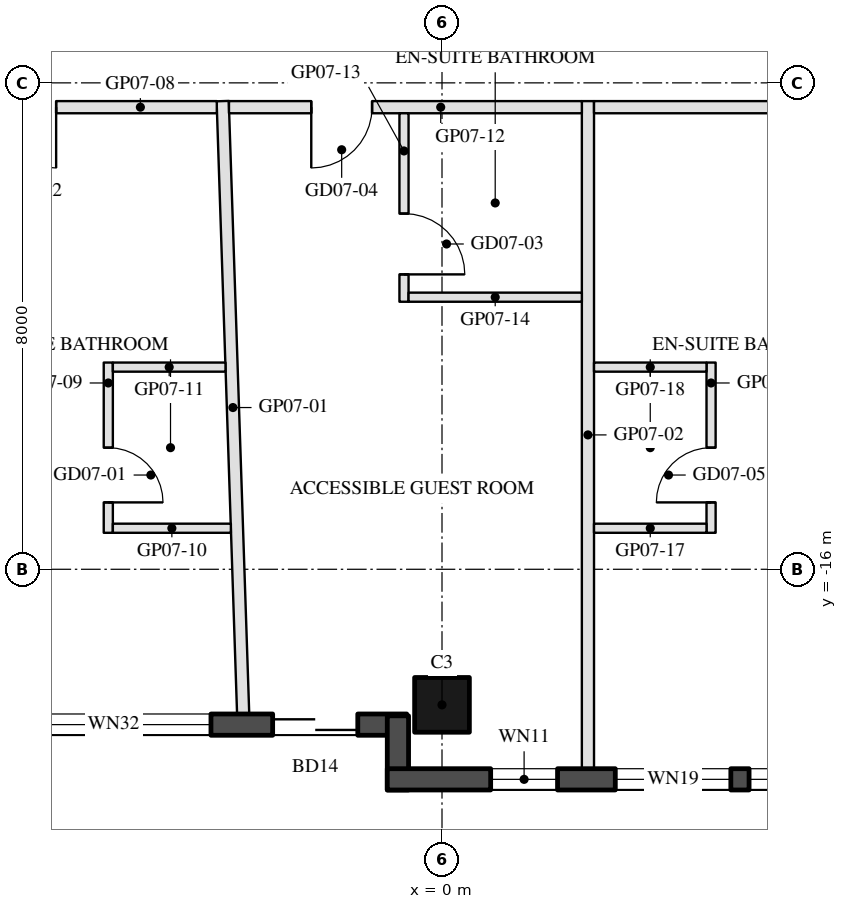
"""IFC4 building model, lengths in metres.
Left out: names, types, materials, properties, quantities, classifications, styles, units other than length and angle.
Written with IfcOpenShell. Run it as: python <this file> out.ifc"""

import sys

from ifc_helpers import new_model, si_unit, direction, frame, frame_2d, origin, origin_2d, place, context, subcontext, project, spatial, rectangle, hollow_rectangle, extrude, element, fill, save


model = new_model("IFC4")
c1 = context("Model", 3, precision=1e-05, world=origin(), true_north=direction((0.0, 1.0)))
c2 = subcontext(c1, "Body", "Model", "MODEL_VIEW")
j1 = project(units=[si_unit("LENGTHUNIT", "METRE"), si_unit("PLANEANGLEUNIT", "RADIAN")], contexts=[c1])
p1 = place(None, origin())
s1 = spatial("IfcSite", under=j1, at=p1, CompositionType="ELEMENT")
p2 = place(p1, origin())
s2 = spatial("IfcBuilding", under=s1, at=p2, CompositionType="ELEMENT")
p3 = place(p2, frame((0.0, 0.0, 94.6)))
s3 = spatial("IfcBuildingStorey", under=s2, at=p3, CompositionType="ELEMENT", Elevation=94.6)
p4 = place(p3, frame((0.0, -18.23, 0.0), z_axis=(0.0, 0.0, 1.0), x_axis=(-1.0, 0.0, 0.0)))
e1 = element("IfcColumn", 1, at=p4, inside=s3, PredefinedType="COLUMN", context=c2, shape_type="SweptSolid", body=[
    extrude(hollow_rectangle(XDim=0.9, YDim=0.9, WallThickness=0.04, at=origin_2d()), origin(), (0.0, 0.0, 1.0), 3.7),
])
p5 = place(p3, frame((-7.32, -18.555, 0.0), z_axis=(0.0, 0.0, 1.0), x_axis=(1.0, 0.0, 0.0)))
e2 = element("IfcWall", 2, at=p5, inside=s3, PredefinedType="SOLIDWALL", context=c2, shape_type="SweptSolid", body=[
    extrude(rectangle(XDim=6.74, YDim=0.35, at=frame_2d((3.37, 0.0))), origin(), (0.0, 0.0, 1.0), 3.55),
])
p6 = place(p5, frame((0.32, 0.0, 0.3)))
e3 = element("IfcOpeningElement", 3, at=p6, cuts=e2, PredefinedType="OPENING", context=c2, shape_type="SweptSolid", body=[
    extrude(rectangle(XDim=3.2, YDim=2.65, at=frame_2d((1.6, 1.325))), frame((0.0, 0.185, 0.0), z_axis=(0.0, -1.0, 0.0), x_axis=(1.0, 0.0, 0.0)), (0.0, 0.0, 1.0), 0.37),
])
p7 = place(p5, frame((4.535, 0.0, 0.0)))
e4 = element("IfcOpeningElement", 4, at=p7, cuts=e2, PredefinedType="OPENING", context=c2, shape_type="SweptSolid", body=[
    extrude(rectangle(XDim=1.4, YDim=2.4, at=frame_2d((0.7, 1.2))), frame((0.0, 0.185, 0.0), z_axis=(0.0, -1.0, 0.0), x_axis=(1.0, 0.0, 0.0)), (0.0, 0.0, 1.0), 0.37),
])
p8 = place(p3, frame((-0.725, -18.41, 0.0), z_axis=(0.0, 0.0, 1.0), x_axis=(0.0, -1.0, 0.0)))
e5 = element("IfcWall", 5, at=p8, inside=s3, PredefinedType="SOLIDWALL", context=c2, shape_type="SweptSolid", body=[
    extrude(rectangle(XDim=1.22, YDim=0.35, at=frame_2d((0.61, 0.0))), origin(), (0.0, 0.0, 1.0), 3.55),
])
p9 = place(p3, frame((-0.9, -19.455, 0.0), z_axis=(0.0, 0.0, 1.0), x_axis=(1.0, 0.0, 0.0)))
e6 = element("IfcWall", 6, at=p9, inside=s3, PredefinedType="SOLIDWALL", context=c2, shape_type="SweptSolid", body=[
    extrude(rectangle(XDim=9.7, YDim=0.35, at=frame_2d((4.85, 0.0))), origin(), (0.0, 0.0, 1.0), 3.55),
])
p10 = place(p9, frame((1.7, 0.0, 0.3)))
e7 = element("IfcOpeningElement", 7, at=p10, cuts=e6, PredefinedType="OPENING", context=c2, shape_type="SweptSolid", body=[
    extrude(rectangle(XDim=1.1, YDim=2.65, at=frame_2d((0.55, 1.325))), frame((0.0, 0.185, 0.0), z_axis=(0.0, -1.0, 0.0), x_axis=(1.0, 0.0, 0.0)), (0.0, 0.0, 1.0), 0.37),
])
p11 = place(p9, frame((3.75, 0.0, 0.3)))
e8 = element("IfcOpeningElement", 8, at=p11, cuts=e6, PredefinedType="OPENING", context=c2, shape_type="SweptSolid", body=[
    extrude(rectangle(XDim=1.9, YDim=2.65, at=frame_2d((0.95, 1.325))), frame((0.0, 0.185, 0.0), z_axis=(0.0, -1.0, 0.0), x_axis=(1.0, 0.0, 0.0)), (0.0, 0.0, 1.0), 0.37),
])
p12 = place(p9, frame((5.95, 0.0, 0.3)))
e9 = element("IfcOpeningElement", 9, at=p12, cuts=e6, PredefinedType="OPENING", context=c2, shape_type="SweptSolid", body=[
    extrude(rectangle(XDim=1.9, YDim=2.65, at=frame_2d((0.95, 1.325))), frame((0.0, 0.185, 0.0), z_axis=(0.0, -1.0, 0.0), x_axis=(1.0, 0.0, 0.0)), (0.0, 0.0, 1.0), 0.37),
])
p13 = place(p3, frame((-3.27, -18.38, 0.0), z_axis=(0.0, 0.0, 1.0), x_axis=(-0.03338172908, 0.999442674776, 0.0)))
e10 = element("IfcWall", 10, at=p13, inside=s3, PredefinedType="PARTITIONING", context=c2, shape_type="SweptSolid", body=[
    extrude(rectangle(XDim=10.085, YDim=0.2, at=frame_2d((5.043, 0.0))), origin(), (0.0, 0.0, 1.0), 2.96),
])
p14 = place(p3, frame((2.4, -19.28, 0.0), z_axis=(0.0, 0.0, 1.0), x_axis=(0.0, 1.0, 0.0)))
e11 = element("IfcWall", 11, at=p14, inside=s3, PredefinedType="PARTITIONING", context=c2, shape_type="SweptSolid", body=[
    extrude(rectangle(XDim=10.98, YDim=0.2, at=frame_2d((5.49, 0.0))), origin(), (0.0, 0.0, 1.0), 2.96),
])
p15 = place(p3, frame((-3.703, -8.4, 0.0), z_axis=(0.0, 0.0, 1.0), x_axis=(-1.0, 0.0, 0.0)))
e12 = element("IfcWall", 12, at=p15, inside=s3, PredefinedType="PARTITIONING", context=c2, shape_type="SweptSolid", body=[
    extrude(rectangle(XDim=6.285, YDim=0.2, at=frame_2d((3.143, 0.0))), origin(), (0.0, 0.0, 1.0), 2.95),
])
p16 = place(p15, frame((2.642, 0.0, 0.0)))
e13 = element("IfcOpeningElement", 13, at=p16, cuts=e12, PredefinedType="OPENING", context=c2, shape_type="SweptSolid", body=[
    extrude(rectangle(XDim=1.0, YDim=2.1, at=frame_2d((0.5, 1.05))), frame((0.0, 0.11, 0.0), z_axis=(0.0, -1.0, 0.0), x_axis=(1.0, 0.0, 0.0)), (0.0, 0.0, 1.0), 0.22),
])
p17 = place(p3, frame((-5.488, -12.6, 0.0), z_axis=(0.0, 0.0, 1.0), x_axis=(0.0, -1.0, 0.0)))
e14 = element("IfcWall", 14, at=p17, inside=s3, PredefinedType="PARTITIONING", context=c2, shape_type="SweptSolid", body=[
    extrude(rectangle(XDim=2.8, YDim=0.15, at=frame_2d((1.4, 0.0))), origin(), (0.0, 0.0, 1.0), 3.55),
])
p18 = place(p17, frame((1.4, 0.0, 0.0)))
e15 = element("IfcOpeningElement", 15, at=p18, cuts=e14, PredefinedType="OPENING", context=c2, shape_type="SweptSolid", body=[
    extrude(rectangle(XDim=0.9, YDim=2.1, at=frame_2d((0.45, 1.05))), frame((0.0, 0.085, 0.0), z_axis=(0.0, -1.0, 0.0), x_axis=(1.0, 0.0, 0.0)), (0.0, 0.0, 1.0), 0.17),
])
p19 = place(p3, frame((-5.413, -15.325, 0.0), z_axis=(0.0, 0.0, 1.0), x_axis=(1.0, 0.0, 0.0)))
e16 = element("IfcWall", 16, at=p19, inside=s3, PredefinedType="PARTITIONING", context=c2, shape_type="SweptSolid", body=[
    extrude(rectangle(XDim=1.941, YDim=0.15, at=frame_2d((0.97, 0.0))), origin(), (0.0, 0.0, 1.0), 2.95),
])
p20 = place(p3, frame((-5.413, -12.675, 0.0), z_axis=(0.0, 0.0, 1.0), x_axis=(1.0, 0.0, 0.0)))
e17 = element("IfcWall", 17, at=p20, inside=s3, PredefinedType="PARTITIONING", context=c2, shape_type="SweptSolid", body=[
    extrude(rectangle(XDim=1.853, YDim=0.15, at=frame_2d((0.926, 0.0))), origin(), (0.0, 0.0, 1.0), 2.95),
])
p21 = place(p3, frame((2.3, -8.4, 0.0), z_axis=(0.0, 0.0, 1.0), x_axis=(-1.0, 0.0, 0.0)))
e18 = element("IfcWall", 18, at=p21, inside=s3, PredefinedType="PARTITIONING", context=c2, shape_type="SweptSolid", body=[
    extrude(rectangle(XDim=5.803, YDim=0.2, at=frame_2d((2.902, 0.0))), origin(), (0.0, 0.0, 1.0), 2.95),
])
p22 = place(p21, frame((3.45, 0.0, 0.0)))
e19 = element("IfcOpeningElement", 19, at=p22, cuts=e18, PredefinedType="OPENING", context=c2, shape_type="SweptSolid", body=[
    extrude(rectangle(XDim=1.0, YDim=2.1, at=frame_2d((0.5, 1.05))), frame((0.0, 0.11, 0.0), z_axis=(0.0, -1.0, 0.0), x_axis=(1.0, 0.0, 0.0)), (0.0, 0.0, 1.0), 0.22),
])
p23 = place(p3, frame((-0.625, -8.5, 0.0), z_axis=(0.0, 0.0, 1.0), x_axis=(0.0, -1.0, 0.0)))
e20 = element("IfcWall", 20, at=p23, inside=s3, PredefinedType="PARTITIONING", context=c2, shape_type="SweptSolid", body=[
    extrude(rectangle(XDim=3.1, YDim=0.15, at=frame_2d((1.55, 0.0))), origin(), (0.0, 0.0, 1.0), 3.55),
])
p24 = place(p23, frame((1.65, 0.0, 0.0)))
e21 = element("IfcOpeningElement", 21, at=p24, cuts=e20, PredefinedType="OPENING", context=c2, shape_type="SweptSolid", body=[
    extrude(rectangle(XDim=1.0, YDim=2.1, at=frame_2d((0.5, 1.05))), frame((0.0, 0.085, 0.0), z_axis=(0.0, -1.0, 0.0), x_axis=(1.0, 0.0, 0.0)), (0.0, 0.0, 1.0), 0.17),
])
p25 = place(p3, frame((-0.55, -11.525, 0.0), z_axis=(0.0, 0.0, 1.0), x_axis=(1.0, 0.0, 0.0)))
e22 = element("IfcWall", 22, at=p25, inside=s3, PredefinedType="PARTITIONING", context=c2, shape_type="SweptSolid", body=[
    extrude(rectangle(XDim=2.85, YDim=0.15, at=frame_2d((1.425, 0.0))), origin(), (0.0, 0.0, 1.0), 2.95),
])
p26 = place(p3, frame((9.988, -8.4, 0.0), z_axis=(0.0, 0.0, 1.0), x_axis=(-1.0, 0.0, 0.0)))
e23 = element("IfcWall", 23, at=p26, inside=s3, PredefinedType="PARTITIONING", context=c2, shape_type="SweptSolid", body=[
    extrude(rectangle(XDim=7.488, YDim=0.2, at=frame_2d((3.744, 0.0))), origin(), (0.0, 0.0, 1.0), 2.95),
])
p27 = place(p26, frame((3.244, 0.0, 0.0)))
e24 = element("IfcOpeningElement", 24, at=p27, cuts=e23, PredefinedType="OPENING", context=c2, shape_type="SweptSolid", body=[
    extrude(rectangle(XDim=1.0, YDim=2.1, at=frame_2d((0.5, 1.05))), frame((0.0, 0.11, 0.0), z_axis=(0.0, -1.0, 0.0), x_axis=(1.0, 0.0, 0.0)), (0.0, 0.0, 1.0), 0.22),
])
p28 = place(p3, frame((4.425, -15.4, 0.0), z_axis=(0.0, 0.0, 1.0), x_axis=(0.0, 1.0, 0.0)))
e25 = element("IfcWall", 25, at=p28, inside=s3, PredefinedType="PARTITIONING", context=c2, shape_type="SweptSolid", body=[
    extrude(rectangle(XDim=2.8, YDim=0.15, at=frame_2d((1.4, 0.0))), origin(), (0.0, 0.0, 1.0), 3.55),
])
p29 = place(p28, frame((0.5, 0.0, 0.0)))
e26 = element("IfcOpeningElement", 26, at=p29, cuts=e25, PredefinedType="OPENING", context=c2, shape_type="SweptSolid", body=[
    extrude(rectangle(XDim=0.9, YDim=2.1, at=frame_2d((0.45, 1.05))), frame((0.0, 0.085, 0.0), z_axis=(0.0, -1.0, 0.0), x_axis=(1.0, 0.0, 0.0)), (0.0, 0.0, 1.0), 0.17),
])
for number, where, z_axis, x_axis in (
    (27, (2.5, -15.325, 0.0), (0.0, 0.0, 1.0), (1.0, 0.0, 0.0)),
    (28, (2.5, -12.675, 0.0), (0.0, 0.0, 1.0), (1.0, 0.0, 0.0)),
):
    element("IfcWall", number, at=place(p3, frame(where, z_axis=z_axis, x_axis=x_axis)), inside=s3, PredefinedType="PARTITIONING", context=c2, shape_type="SweptSolid", body=[
        extrude(rectangle(XDim=1.85, YDim=0.15, at=frame_2d((0.925, 0.0))), origin(), (0.0, 0.0, 1.0), 2.95),
    ])
p30 = place(p6, origin())
e29 = element("IfcWindow", 29, at=p30, inside=s3, PartitioningType="SINGLE_PANEL", PredefinedType="WINDOW", context=c2, shape_type="SweptSolid", body=[
    extrude(rectangle(XDim=3.2, YDim=2.65, at=frame_2d((1.6, 1.325))), frame((0.0, 0.03, 0.0), z_axis=(0.0, -1.0, 0.0), x_axis=(1.0, 0.0, 0.0)), (0.0, 0.0, 1.0), 0.06),
])
fill(e3, e29)
p31 = place(p7, frame((1.4, 0.0, 0.0), z_axis=(0.0, 0.0, 1.0), x_axis=(-1.0, 0.0, 0.0)))
e30 = element("IfcDoor", 30, at=p31, inside=s3, OperationType="SLIDING_TO_LEFT", PredefinedType="DOOR", context=c2, shape_type="SweptSolid", body=[
    extrude(rectangle(XDim=1.4, YDim=2.4, at=frame_2d((0.7, 1.2))), frame((0.0, 0.025, 0.0), z_axis=(0.0, -1.0, 0.0), x_axis=(1.0, 0.0, 0.0)), (0.0, 0.0, 1.0), 0.05),
])
fill(e4, e30)
p32 = place(p10, origin())
e31 = element("IfcWindow", 31, at=p32, inside=s3, PartitioningType="SINGLE_PANEL", PredefinedType="WINDOW", context=c2, shape_type="SweptSolid", body=[
    extrude(rectangle(XDim=1.1, YDim=2.65, at=frame_2d((0.55, 1.325))), frame((0.0, 0.03, 0.0), z_axis=(0.0, -1.0, 0.0), x_axis=(1.0, 0.0, 0.0)), (0.0, 0.0, 1.0), 0.06),
])
fill(e7, e31)
p33 = place(p11, origin())
e32 = element("IfcWindow", 32, at=p33, inside=s3, PartitioningType="SINGLE_PANEL", PredefinedType="WINDOW", context=c2, shape_type="SweptSolid", body=[
    extrude(rectangle(XDim=1.9, YDim=2.65, at=frame_2d((0.95, 1.325))), frame((0.0, 0.03, 0.0), z_axis=(0.0, -1.0, 0.0), x_axis=(1.0, 0.0, 0.0)), (0.0, 0.0, 1.0), 0.06),
])
fill(e8, e32)
p34 = place(p12, origin())
e33 = element("IfcWindow", 33, at=p34, inside=s3, PartitioningType="SINGLE_PANEL", PredefinedType="WINDOW", context=c2, shape_type="SweptSolid", body=[
    extrude(rectangle(XDim=1.9, YDim=2.65, at=frame_2d((0.95, 1.325))), frame((0.0, 0.03, 0.0), z_axis=(0.0, -1.0, 0.0), x_axis=(1.0, 0.0, 0.0)), (0.0, 0.0, 1.0), 0.06),
])
fill(e9, e33)
p35 = place(p18, origin())
e34 = element("IfcDoor", 34, at=p35, inside=s3, OperationType="SINGLE_SWING_RIGHT", PredefinedType="DOOR", context=c2, shape_type="SweptSolid", body=[
    extrude(rectangle(XDim=0.9, YDim=2.1, at=frame_2d((0.45, 1.05))), frame((0.0, 0.025, 0.0), z_axis=(0.0, -1.0, 0.0), x_axis=(1.0, 0.0, 0.0)), (0.0, 0.0, 1.0), 0.05),
])
fill(e15, e34)
p36 = place(p16, origin())
e35 = element("IfcDoor", 35, at=p36, inside=s3, OperationType="SINGLE_SWING_LEFT", PredefinedType="DOOR", context=c2, shape_type="SweptSolid", body=[
    extrude(rectangle(XDim=1.0, YDim=2.1, at=frame_2d((0.5, 1.05))), frame((0.0, 0.025, 0.0), z_axis=(0.0, -1.0, 0.0), x_axis=(1.0, 0.0, 0.0)), (0.0, 0.0, 1.0), 0.05),
])
fill(e13, e35)
p37 = place(p24, origin())
e36 = element("IfcDoor", 36, at=p37, inside=s3, OperationType="SINGLE_SWING_RIGHT", PredefinedType="DOOR", context=c2, shape_type="SweptSolid", body=[
    extrude(rectangle(XDim=1.0, YDim=2.1, at=frame_2d((0.5, 1.05))), frame((0.0, 0.025, 0.0), z_axis=(0.0, -1.0, 0.0), x_axis=(1.0, 0.0, 0.0)), (0.0, 0.0, 1.0), 0.05),
])
fill(e21, e36)
p38 = place(p22, origin())
e37 = element("IfcDoor", 37, at=p38, inside=s3, OperationType="SINGLE_SWING_RIGHT", PredefinedType="DOOR", context=c2, shape_type="SweptSolid", body=[
    extrude(rectangle(XDim=1.0, YDim=2.1, at=frame_2d((0.5, 1.05))), frame((0.0, 0.025, 0.0), z_axis=(0.0, -1.0, 0.0), x_axis=(1.0, 0.0, 0.0)), (0.0, 0.0, 1.0), 0.05),
])
fill(e19, e37)
p39 = place(p29, origin())
e38 = element("IfcDoor", 38, at=p39, inside=s3, OperationType="SINGLE_SWING_LEFT", PredefinedType="DOOR", context=c2, shape_type="SweptSolid", body=[
    extrude(rectangle(XDim=0.9, YDim=2.1, at=frame_2d((0.45, 1.05))), frame((0.0, 0.025, 0.0), z_axis=(0.0, -1.0, 0.0), x_axis=(1.0, 0.0, 0.0)), (0.0, 0.0, 1.0), 0.05),
])
fill(e26, e38)
save(model, sys.argv[1])
